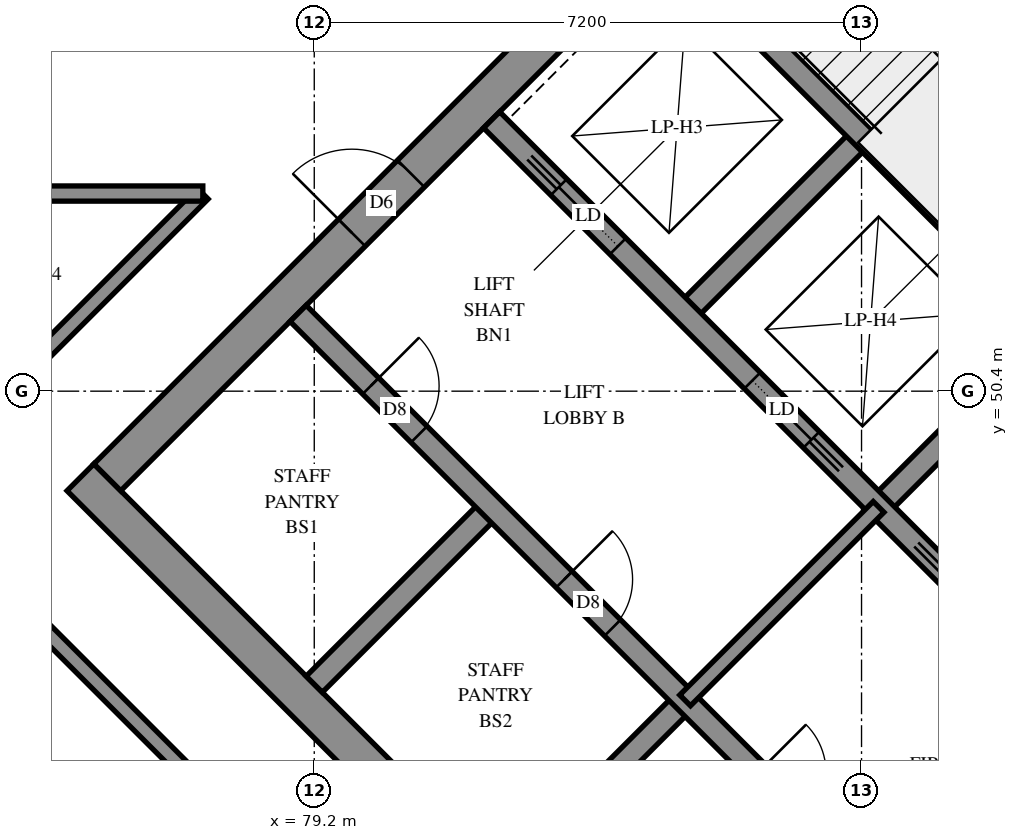
"""IFC4 building model, lengths in metres.
Left out: names, types, materials, properties, quantities, classifications, styles, units other than length and angle.
Written with IfcOpenShell. Run it as: python <this file> out.ifc"""

import sys

from ifc_helpers import new_model, si_unit, direction, frame, frame_2d, origin, place, context, subcontext, project, spatial, rectangle, extrude, element, fill, save


model = new_model("IFC4")
c1 = context("Model", 3, precision=1e-05, world=origin(), true_north=direction((0.0, 1.0)))
c2 = subcontext(c1, "Body", "Model", "MODEL_VIEW")
j1 = project(units=[si_unit("LENGTHUNIT", "METRE"), si_unit("PLANEANGLEUNIT", "RADIAN")], contexts=[c1])
p1 = place(None, origin())
s1 = spatial("IfcSite", under=j1, at=p1, CompositionType="ELEMENT")
p2 = place(p1, origin())
s2 = spatial("IfcBuilding", under=s1, at=p2, CompositionType="ELEMENT")
p3 = place(p2, frame((0.0, 0.0, 189.6)))
s3 = spatial("IfcBuildingStorey", under=s2, at=p3, CompositionType="ELEMENT", Elevation=189.6)
p4 = place(p3, frame((76.124, 49.267, -0.3), z_axis=(0.0, 0.0, 1.0), x_axis=(0.7071067812, -0.7071067812, 0.0)))
e1 = element("IfcWall", 1, at=p4, inside=s3, PredefinedType="SHEAR", context=c2, shape_type="SweptSolid", body=[
    extrude(rectangle(XDim=15.4, YDim=0.5, at=frame_2d((7.7, 0.0))), origin(), (0.0, 0.0, 1.0), 2.7),
])
p5 = place(p3, frame((86.66, 59.802, -0.3), z_axis=(0.0, 0.0, 1.0), x_axis=(0.7071067812, -0.7071067812, 0.0)))
e2 = element("IfcWall", 2, at=p5, inside=s3, PredefinedType="SHEAR", context=c2, shape_type="SweptSolid", body=[
    extrude(rectangle(XDim=15.4, YDim=0.5, at=frame_2d((7.7, 0.0))), origin(), (0.0, 0.0, 1.0), 2.7),
])
p6 = place(p5, frame((10.5, 0.0, 0.3)))
e3 = element("IfcOpeningElement", 3, at=p6, cuts=e2, PredefinedType="OPENING", context=c2, shape_type="SweptSolid", body=[
    extrude(rectangle(XDim=0.8, YDim=2.1, at=frame_2d((0.4, 1.05))), frame((0.0, 0.26, 0.0), z_axis=(0.0, -1.0, 0.0), x_axis=(1.0, 0.0, 0.0)), (0.0, 0.0, 1.0), 0.52),
])
p7 = place(p3, frame((76.478, 49.267, -0.3), z_axis=(0.0, 0.0, 1.0), x_axis=(0.7071067812, 0.7071067812, 0.0)))
e4 = element("IfcWall", 4, at=p7, inside=s3, PredefinedType="SHEAR", context=c2, shape_type="SweptSolid", body=[
    extrude(rectangle(XDim=14.4, YDim=0.5, at=frame_2d((7.2, 0.0))), origin(), (0.0, 0.0, 1.0), 2.7),
])
p8 = place(p7, frame((4.55, 0.0, 0.3)))
e5 = element("IfcOpeningElement", 5, at=p8, cuts=e4, PredefinedType="OPENING", context=c2, shape_type="SweptSolid", body=[
    extrude(rectangle(XDim=1.1, YDim=2.1, at=frame_2d((0.55, 1.05))), frame((0.0, 0.26, 0.0), z_axis=(0.0, -1.0, 0.0), x_axis=(1.0, 0.0, 0.0)), (0.0, 0.0, 1.0), 0.52),
])
p9 = place(p7, frame((11.35, 0.0, 0.3)))
e6 = element("IfcOpeningElement", 6, at=p9, cuts=e4, PredefinedType="OPENING", context=c2, shape_type="SweptSolid", body=[
    extrude(rectangle(XDim=1.1, YDim=2.1, at=frame_2d((0.55, 1.05))), frame((0.0, 0.26, 0.0), z_axis=(0.0, -1.0, 0.0), x_axis=(1.0, 0.0, 0.0)), (0.0, 0.0, 1.0), 0.52),
])
p10 = place(p3, frame((87.013, 38.731, -0.3), z_axis=(0.0, 0.0, 1.0), x_axis=(0.7071067812, 0.7071067812, 0.0)))
e7 = element("IfcWall", 7, at=p10, inside=s3, PredefinedType="SHEAR", context=c2, shape_type="SweptSolid", body=[
    extrude(rectangle(XDim=14.4, YDim=0.5, at=frame_2d((7.2, 0.0))), origin(), (0.0, 0.0, 1.0), 2.7),
])
p11 = place(p10, frame((4.55, 0.0, 0.3)))
e8 = element("IfcOpeningElement", 8, at=p11, cuts=e7, PredefinedType="OPENING", context=c2, shape_type="SweptSolid", body=[
    extrude(rectangle(XDim=1.1, YDim=2.1, at=frame_2d((0.55, 1.05))), frame((0.0, 0.26, 0.0), z_axis=(0.0, -1.0, 0.0), x_axis=(1.0, 0.0, 0.0)), (0.0, 0.0, 1.0), 0.52),
])
p12 = place(p10, frame((11.35, 0.0, 0.3)))
e9 = element("IfcOpeningElement", 9, at=p12, cuts=e7, PredefinedType="OPENING", context=c2, shape_type="SweptSolid", body=[
    extrude(rectangle(XDim=1.1, YDim=2.1, at=frame_2d((0.55, 1.05))), frame((0.0, 0.26, 0.0), z_axis=(0.0, -1.0, 0.0), x_axis=(1.0, 0.0, 0.0)), (0.0, 0.0, 1.0), 0.52),
])
for number, where, z_axis, x_axis in (
    (10, (79.2, 46.544, 0.0), (0.0, 0.0, 1.0), (0.707, 0.707, 0.0)),
    (11, (84.079, 51.423, 0.0), (0.0, 0.0, 1.0), (0.707, 0.707, 0.0)),
):
    element("IfcWall", number, at=place(p3, frame(where, z_axis=z_axis, x_axis=x_axis)), inside=s3, PredefinedType="SOLIDWALL", context=c2, shape_type="SweptSolid", body=[
        extrude(rectangle(XDim=3.3, YDim=0.3, at=frame_2d((1.65, 0.0))), origin(), (0.0, 0.0, 1.0), 3.1),
    ])
p13 = place(p3, frame((81.746, 43.999, 0.0), z_axis=(0.0, 0.0, 1.0), x_axis=(0.7071067812, 0.7071067812, 0.0)))
e12 = element("IfcWall", 12, at=p13, inside=s3, PredefinedType="SOLIDWALL", context=c2, shape_type="SweptSolid", body=[
    extrude(rectangle(XDim=3.3, YDim=0.3, at=frame_2d((1.65, 0.0))), origin(), (0.0, 0.0, 1.0), 3.1),
])
p14 = place(p3, frame((86.625, 48.878, 0.0), z_axis=(0.0, 0.0, 1.0), x_axis=(0.7071067812, 0.7071067812, 0.0)))
e13 = element("IfcWall", 13, at=p14, inside=s3, PredefinedType="SOLIDWALL", context=c2, shape_type="SweptSolid", body=[
    extrude(rectangle(XDim=3.3, YDim=0.3, at=frame_2d((1.65, 0.0))), origin(), (0.0, 0.0, 1.0), 3.1),
])
p15 = place(p3, frame((78.988, 51.423, 0.0), z_axis=(0.0, 0.0, 1.0), x_axis=(0.7071067812, -0.7071067812, 0.0)))
e14 = element("IfcWall", 14, at=p15, inside=s3, PredefinedType="SOLIDWALL", context=c2, shape_type="SweptSolid", body=[
    extrude(rectangle(XDim=14.4, YDim=0.3, at=frame_2d((7.2, 0.0))), origin(), (0.0, 0.0, 1.0), 3.1),
])
p16 = place(p15, frame((1.35, 0.0, 0.0)))
e15 = element("IfcOpeningElement", 15, at=p16, cuts=e14, PredefinedType="OPENING", context=c2, shape_type="SweptSolid", body=[
    extrude(rectangle(XDim=0.9, YDim=2.1, at=frame_2d((0.45, 1.05))), frame((0.0, 0.16, 0.0), z_axis=(0.0, -1.0, 0.0), x_axis=(1.0, 0.0, 0.0)), (0.0, 0.0, 1.0), 0.32),
])
p17 = place(p15, frame((4.95, 0.0, 0.0)))
e16 = element("IfcOpeningElement", 16, at=p17, cuts=e14, PredefinedType="OPENING", context=c2, shape_type="SweptSolid", body=[
    extrude(rectangle(XDim=0.9, YDim=2.1, at=frame_2d((0.45, 1.05))), frame((0.0, 0.16, 0.0), z_axis=(0.0, -1.0, 0.0), x_axis=(1.0, 0.0, 0.0)), (0.0, 0.0, 1.0), 0.32),
])
p18 = place(p15, frame((8.55, 0.0, 0.0)))
e17 = element("IfcOpeningElement", 17, at=p18, cuts=e14, PredefinedType="OPENING", context=c2, shape_type="SweptSolid", body=[
    extrude(rectangle(XDim=0.9, YDim=2.1, at=frame_2d((0.45, 1.05))), frame((0.0, 0.16, 0.0), z_axis=(0.0, -1.0, 0.0), x_axis=(1.0, 0.0, 0.0)), (0.0, 0.0, 1.0), 0.32),
])
p19 = place(p15, frame((12.05, 0.0, 0.0)))
e18 = element("IfcOpeningElement", 18, at=p19, cuts=e14, PredefinedType="OPENING", context=c2, shape_type="SweptSolid", body=[
    extrude(rectangle(XDim=1.1, YDim=2.1, at=frame_2d((0.55, 1.05))), frame((0.0, 0.16, 0.0), z_axis=(0.0, -1.0, 0.0), x_axis=(1.0, 0.0, 0.0)), (0.0, 0.0, 1.0), 0.32),
])
p20 = place(p3, frame((81.534, 53.969, 0.0), z_axis=(0.0, 0.0, 1.0), x_axis=(0.707103309, -0.7071102534, 0.0)))
e19 = element("IfcWall", 19, at=p20, inside=s3, PredefinedType="SOLIDWALL", context=c2, shape_type="SweptSolid", body=[
    extrude(rectangle(XDim=14.4, YDim=0.3, at=frame_2d((7.2, 0.0))), origin(), (0.0, 0.0, 1.0), 3.1),
])
p21 = place(p20, frame((1.25, 0.0, 0.0)))
e20 = element("IfcOpeningElement", 20, at=p21, cuts=e19, PredefinedType="OPENING", context=c2, shape_type="SweptSolid", body=[
    extrude(rectangle(XDim=1.1, YDim=2.1, at=frame_2d((0.55, 1.05))), frame((0.0, 0.16, 0.0), z_axis=(0.0, -1.0, 0.0), x_axis=(1.0, 0.0, 0.0)), (0.0, 0.0, 1.0), 0.32),
])
p22 = place(p20, frame((4.85, 0.0, 0.0)))
e21 = element("IfcOpeningElement", 21, at=p22, cuts=e19, PredefinedType="OPENING", context=c2, shape_type="SweptSolid", body=[
    extrude(rectangle(XDim=1.1, YDim=2.1, at=frame_2d((0.55, 1.05))), frame((0.0, 0.16, 0.0), z_axis=(0.0, -1.0, 0.0), x_axis=(1.0, 0.0, 0.0)), (0.0, 0.0, 1.0), 0.32),
])
p23 = place(p20, frame((8.45, 0.0, 0.0)))
e22 = element("IfcOpeningElement", 22, at=p23, cuts=e19, PredefinedType="OPENING", context=c2, shape_type="SweptSolid", body=[
    extrude(rectangle(XDim=1.1, YDim=2.1, at=frame_2d((0.55, 1.05))), frame((0.0, 0.16, 0.0), z_axis=(0.0, -1.0, 0.0), x_axis=(1.0, 0.0, 0.0)), (0.0, 0.0, 1.0), 0.32),
])
p24 = place(p20, frame((12.05, 0.0, 0.0)))
e23 = element("IfcOpeningElement", 23, at=p24, cuts=e19, PredefinedType="OPENING", context=c2, shape_type="SweptSolid", body=[
    extrude(rectangle(XDim=1.1, YDim=2.1, at=frame_2d((0.55, 1.05))), frame((0.0, 0.16, 0.0), z_axis=(0.0, -1.0, 0.0), x_axis=(1.0, 0.0, 0.0)), (0.0, 0.0, 1.0), 0.32),
])
p25 = place(p3, frame((83.867, 56.302, 0.0), z_axis=(0.0, 0.0, 1.0), x_axis=(0.7071137256, -0.7070998367, 0.0)))
e24 = element("IfcWall", 24, at=p25, inside=s3, PredefinedType="SOLIDWALL", context=c2, shape_type="SweptSolid", body=[
    extrude(rectangle(XDim=7.2, YDim=0.3, at=frame_2d((3.6, 0.0))), origin(), (0.0, 0.0, 1.0), 3.1),
])
p26 = place(p3, frame((84.079, 46.332, 0.0), z_axis=(0.0, 0.0, 1.0), x_axis=(0.7071067812, 0.7071067812, 0.0)))
e25 = element("IfcWall", 25, at=p26, inside=s3, PredefinedType="PARTITIONING", context=c2, shape_type="SweptSolid", body=[
    extrude(rectangle(XDim=3.6, YDim=0.2, at=frame_2d((1.8, 0.0))), origin(), (0.0, 0.0, 1.0), 3.1),
])
p27 = place(p3, frame((73.999, 48.911, 0.0), z_axis=(0.0, 0.0, 1.0), x_axis=(0.7071067812, -0.7071067812, 0.0)))
e26 = element("IfcWall", 26, at=p27, inside=s3, PredefinedType="PARTITIONING", context=c2, shape_type="SweptSolid", body=[
    extrude(rectangle(XDim=5.745, YDim=0.2, at=frame_2d((2.872, 0.0))), origin(), (0.0, 0.0, 1.0), 3.1),
])
p28 = place(p27, frame((0.724, 0.0, 0.0)))
e27 = element("IfcOpeningElement", 27, at=p28, cuts=e26, PredefinedType="OPENING", context=c2, shape_type="SweptSolid", body=[
    extrude(rectangle(XDim=1.0, YDim=2.1, at=frame_2d((0.5, 1.05))), frame((0.0, 0.11, 0.0), z_axis=(0.0, -1.0, 0.0), x_axis=(1.0, 0.0, 0.0)), (0.0, 0.0, 1.0), 0.22),
])
p29 = place(p3, frame((74.001, 49.267, 0.0), z_axis=(0.0, 0.0, 1.0), x_axis=(0.7071067812, 0.7071067812, 0.0)))
e28 = element("IfcWall", 28, at=p29, inside=s3, PredefinedType="PARTITIONING", context=c2, shape_type="SweptSolid", body=[
    extrude(rectangle(XDim=5.278, YDim=0.2, at=frame_2d((2.639, 0.0))), origin(), (0.0, 0.0, 1.0), 3.1),
])
p30 = place(p3, frame((74.002, 53.0, 0.0), z_axis=(0.0, 0.0, 1.0), x_axis=(1.0, 0.0, 0.0)))
e29 = element("IfcWall", 29, at=p30, inside=s3, PredefinedType="PARTITIONING", context=c2, shape_type="SweptSolid", body=[
    extrude(rectangle(XDim=3.732, YDim=0.2, at=frame_2d((1.866, 0.0))), origin(), (0.0, 0.0, 1.0), 3.1),
])
p31 = place(p30, frame((0.564, 0.0, 0.0)))
e30 = element("IfcOpeningElement", 30, at=p31, cuts=e29, PredefinedType="OPENING", context=c2, shape_type="SweptSolid", body=[
    extrude(rectangle(XDim=1.0, YDim=2.1, at=frame_2d((0.5, 1.05))), frame((0.0, 0.11, 0.0), z_axis=(0.0, -1.0, 0.0), x_axis=(1.0, 0.0, 0.0)), (0.0, 0.0, 1.0), 0.22),
])
p32 = place(p8, origin())
e31 = element("IfcDoor", 31, at=p32, inside=s3, OperationType="DOUBLE_DOOR_SINGLE_SWING", PredefinedType="DOOR", context=c2, shape_type="SweptSolid", body=[
    extrude(rectangle(XDim=1.1, YDim=2.1, at=frame_2d((0.55, 1.05))), frame((0.0, 0.025, 0.0), z_axis=(0.0, -1.0, 0.0), x_axis=(1.0, 0.0, 0.0)), (0.0, 0.0, 1.0), 0.05),
])
fill(e5, e31)
p33 = place(p16, origin())
e32 = element("IfcDoor", 32, at=p33, inside=s3, OperationType="SINGLE_SWING_LEFT", PredefinedType="DOOR", context=c2, shape_type="SweptSolid", body=[
    extrude(rectangle(XDim=0.9, YDim=2.1, at=frame_2d((0.45, 1.05))), frame((0.0, 0.025, 0.0), z_axis=(0.0, -1.0, 0.0), x_axis=(1.0, 0.0, 0.0)), (0.0, 0.0, 1.0), 0.05),
])
fill(e15, e32)
p34 = place(p17, origin())
e33 = element("IfcDoor", 33, at=p34, inside=s3, OperationType="SINGLE_SWING_LEFT", PredefinedType="DOOR", context=c2, shape_type="SweptSolid", body=[
    extrude(rectangle(XDim=0.9, YDim=2.1, at=frame_2d((0.45, 1.05))), frame((0.0, 0.025, 0.0), z_axis=(0.0, -1.0, 0.0), x_axis=(1.0, 0.0, 0.0)), (0.0, 0.0, 1.0), 0.05),
])
fill(e16, e33)
p35 = place(p21, origin())
e34 = element("IfcDoor", 34, at=p35, inside=s3, OperationType="SLIDING_TO_LEFT", PredefinedType="DOOR", context=c2, shape_type="SweptSolid", body=[
    extrude(rectangle(XDim=1.1, YDim=2.1, at=frame_2d((0.55, 1.05))), frame((0.0, 0.025, 0.0), z_axis=(0.0, -1.0, 0.0), x_axis=(1.0, 0.0, 0.0)), (0.0, 0.0, 1.0), 0.05),
])
fill(e20, e34)
p36 = place(p22, origin())
e35 = element("IfcDoor", 35, at=p36, inside=s3, OperationType="SLIDING_TO_RIGHT", PredefinedType="DOOR", context=c2, shape_type="SweptSolid", body=[
    extrude(rectangle(XDim=1.1, YDim=2.1, at=frame_2d((0.55, 1.05))), frame((0.0, 0.025, 0.0), z_axis=(0.0, -1.0, 0.0), x_axis=(1.0, 0.0, 0.0)), (0.0, 0.0, 1.0), 0.05),
])
fill(e21, e35)
save(model, sys.argv[1])
